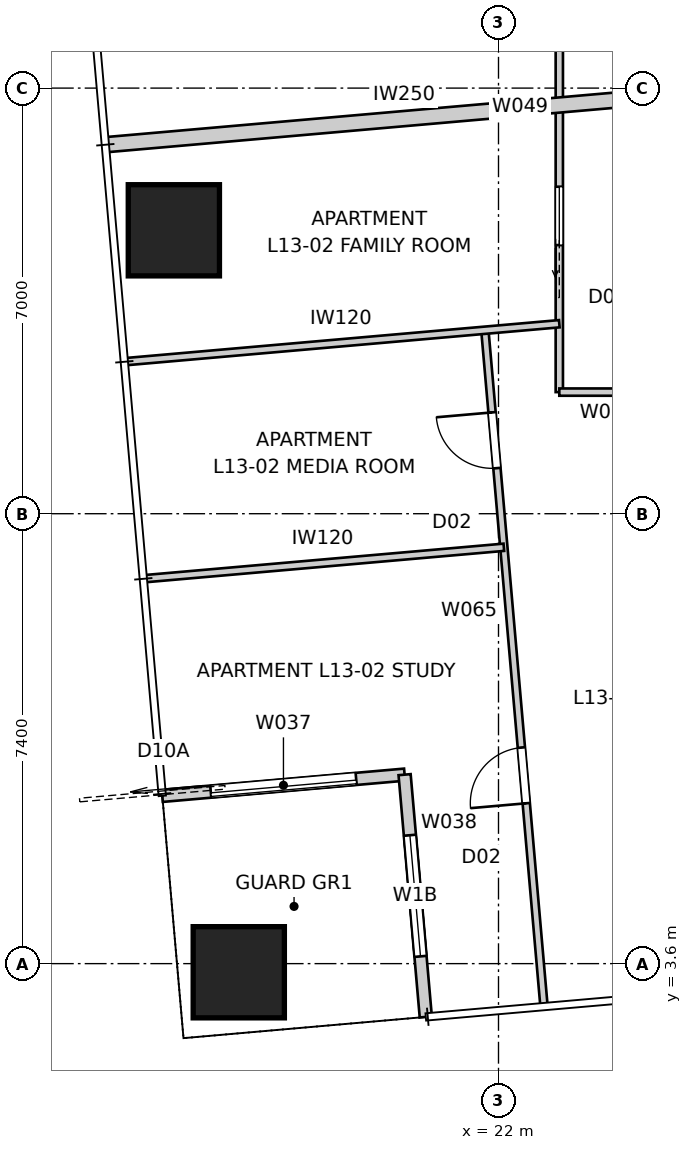
"""IFC4 building model, lengths in metres.
Left out: names, types, materials, properties, quantities, classifications, styles, units other than length and angle.
Written with IfcOpenShell. Run it as: python <this file> out.ifc"""

import sys

from ifc_helpers import new_model, si_unit, direction, frame, frame_2d, origin, origin_2d, place, context, subcontext, project, spatial, rectangle, extrude, element, fill, save


model = new_model("IFC4")
c1 = context("Model", 3, precision=1e-05, world=origin(), true_north=direction((0.0, 1.0)))
c2 = subcontext(c1, "Body", "Model", "MODEL_VIEW")
j1 = project(units=[si_unit("LENGTHUNIT", "METRE"), si_unit("PLANEANGLEUNIT", "RADIAN")], contexts=[c1])
p1 = place(None, origin())
s1 = spatial("IfcSite", under=j1, at=p1, CompositionType="ELEMENT")
p2 = place(p1, origin())
s2 = spatial("IfcBuilding", under=s1, at=p2, CompositionType="ELEMENT")
p3 = place(p2, frame((0.0, 0.0, 50.6)))
s3 = spatial("IfcBuildingStorey", under=s2, at=p3, CompositionType="ELEMENT", Elevation=50.6)
for number, where, z_axis, x_axis in (
    (1, (17.729, 3.458, 0.0), (0.0, 0.0, 1.0), (1.0, 0.0, 0.0)),
    (2, (16.661, 15.661, 0.0), (0.0, 0.0, 1.0), (1.0, 0.0, 0.0)),
):
    element("IfcColumn", number, at=place(p3, frame(where, z_axis=z_axis, x_axis=x_axis)), inside=s3, PredefinedType="COLUMN", context=c2, shape_type="SweptSolid", body=[
        extrude(rectangle(XDim=1.5, YDim=1.5, at=origin_2d()), origin(), (0.0, 0.0, 1.0), 3.4),
    ])
p4 = place(p3, frame((16.471, 6.359, 0.0), z_axis=(0.0, 0.0, 1.0), x_axis=(0.99619418125, 0.087161650072, 0.0)))
e3 = element("IfcWall", 3, at=p4, inside=s3, PredefinedType="SOLIDWALL", context=c2, shape_type="SweptSolid", body=[
    extrude(rectangle(XDim=4.0, YDim=0.2, at=frame_2d((2.0, 0.0))), origin(), (0.0, 0.0, 1.0), 3.25),
])
p5 = place(p4, frame((0.8, 0.0, 0.0)))
e4 = element("IfcOpeningElement", 4, at=p5, cuts=e3, PredefinedType="OPENING", context=c2, shape_type="SweptSolid", body=[
    extrude(rectangle(XDim=2.4, YDim=2.1, at=frame_2d((1.2, 1.05))), frame((0.0, 0.11, 0.0), z_axis=(0.0, -1.0, 0.0), x_axis=(1.0, 0.0, 0.0)), (0.0, 0.0, 1.0), 0.22),
])
p6 = place(p3, frame((20.456, 6.708, 0.0), z_axis=(0.0, 0.0, 1.0), x_axis=(0.087156350505, -0.99619464492, 0.0)))
e5 = element("IfcWall", 5, at=p6, inside=s3, PredefinedType="SOLIDWALL", context=c2, shape_type="SweptSolid", body=[
    extrude(rectangle(XDim=4.0, YDim=0.2, at=frame_2d((2.0, 0.0))), origin(), (0.0, 0.0, 1.0), 3.25),
])
p7 = place(p6, frame((1.0, 0.0, 0.45)))
e6 = element("IfcOpeningElement", 6, at=p7, cuts=e5, PredefinedType="OPENING", context=c2, shape_type="SweptSolid", body=[
    extrude(rectangle(XDim=2.0, YDim=1.8, at=frame_2d((1.0, 0.9))), frame((0.0, 0.11, 0.0), z_axis=(0.0, -1.0, 0.0), x_axis=(1.0, 0.0, 0.0)), (0.0, 0.0, 1.0), 0.22),
])
p8 = place(p3, frame((15.534, 17.068, 0.0), z_axis=(0.0, 0.0, 1.0), x_axis=(0.996194517831, 0.087157803114, 0.0)))
e7 = element("IfcWall", 7, at=p8, inside=s3, PredefinedType="PARTITIONING", context=c2, shape_type="SweptSolid", body=[
    extrude(rectangle(XDim=9.933, YDim=0.25, at=frame_2d((4.966, 0.0))), origin(), (0.0, 0.0, 1.0), 3.25),
])
p9 = place(p3, frame((23.0, 13.0, 0.0), z_axis=(0.0, 0.0, 1.0), x_axis=(0.0, 1.0, 0.0)))
e8 = element("IfcWall", 8, at=p9, inside=s3, PredefinedType="PARTITIONING", context=c2, shape_type="SweptSolid", body=[
    extrude(rectangle(XDim=6.0, YDim=0.12, at=frame_2d((3.0, 0.0))), origin(), (0.0, 0.0, 1.0), 3.25),
])
p10 = place(p9, frame((2.418, 0.0, 0.0)))
e9 = element("IfcOpeningElement", 9, at=p10, cuts=e8, PredefinedType="OPENING", context=c2, shape_type="SweptSolid", body=[
    extrude(rectangle(XDim=0.96, YDim=2.1, at=frame_2d((0.48, 1.05))), frame((0.0, 0.07, 0.0), z_axis=(0.0, -1.0, 0.0), x_axis=(1.0, 0.0, 0.0)), (0.0, 0.0, 1.0), 0.14),
])
p11 = place(p3, frame((29.0, 13.0, 0.0), z_axis=(0.0, 0.0, 1.0), x_axis=(-1.0, 0.0, 0.0)))
e10 = element("IfcWall", 10, at=p11, inside=s3, PredefinedType="PARTITIONING", context=c2, shape_type="SweptSolid", body=[
    extrude(rectangle(XDim=6.0, YDim=0.12, at=frame_2d((3.0, 0.0))), origin(), (0.0, 0.0, 1.0), 3.25),
])
p12 = place(p11, frame((3.445, 0.0, 0.0)))
e11 = element("IfcOpeningElement", 11, at=p12, cuts=e10, PredefinedType="OPENING", context=c2, shape_type="SweptSolid", body=[
    extrude(rectangle(XDim=0.96, YDim=2.1, at=frame_2d((0.48, 1.05))), frame((0.0, 0.07, 0.0), z_axis=(0.0, -1.0, 0.0), x_axis=(1.0, 0.0, 0.0)), (0.0, 0.0, 1.0), 0.14),
])
p13 = place(p11, frame((0.769, 0.0, 0.0)))
e12 = element("IfcOpeningElement", 12, at=p13, cuts=e10, PredefinedType="OPENING", context=c2, shape_type="SweptSolid", body=[
    extrude(rectangle(XDim=0.96, YDim=2.1, at=frame_2d((0.48, 1.05))), frame((0.0, 0.07, 0.0), z_axis=(0.0, -1.0, 0.0), x_axis=(1.0, 0.0, 0.0)), (0.0, 0.0, 1.0), 0.14),
])
p14 = place(p3, frame((22.745, 2.933, 0.0), z_axis=(0.0, 0.0, 1.0), x_axis=(-0.087152252187, 0.99619500347, 0.0)))
e13 = element("IfcWall", 13, at=p14, inside=s3, PredefinedType="PARTITIONING", context=c2, shape_type="SweptSolid", body=[
    extrude(rectangle(XDim=11.127, YDim=0.12, at=frame_2d((5.563, 0.0))), origin(), (0.0, 0.0, 1.0), 3.25),
])
p15 = place(p14, frame((3.317, 0.0, 0.0)))
e14 = element("IfcOpeningElement", 14, at=p15, cuts=e13, PredefinedType="OPENING", context=c2, shape_type="SweptSolid", body=[
    extrude(rectangle(XDim=0.92, YDim=2.34, at=frame_2d((0.46, 1.17))), frame((0.0, 0.07, 0.0), z_axis=(0.0, -1.0, 0.0), x_axis=(1.0, 0.0, 0.0)), (0.0, 0.0, 1.0), 0.14),
])
p16 = place(p14, frame((8.85, 0.0, 0.0)))
e15 = element("IfcOpeningElement", 15, at=p16, cuts=e13, PredefinedType="OPENING", context=c2, shape_type="SweptSolid", body=[
    extrude(rectangle(XDim=0.92, YDim=2.34, at=frame_2d((0.46, 1.17))), frame((0.0, 0.07, 0.0), z_axis=(0.0, -1.0, 0.0), x_axis=(1.0, 0.0, 0.0)), (0.0, 0.0, 1.0), 0.14),
])
p17 = place(p3, frame((15.886, 13.502, 0.0), z_axis=(0.0, 0.0, 1.0), x_axis=(0.996195424363, 0.087147441029, 0.0)))
e16 = element("IfcWall", 16, at=p17, inside=s3, PredefinedType="PARTITIONING", context=c2, shape_type="SweptSolid", body=[
    extrude(rectangle(XDim=7.141, YDim=0.12, at=frame_2d((3.57, 0.0))), origin(), (0.0, 0.0, 1.0), 2.638),
])
p18 = place(p3, frame((16.198, 9.933, 0.0), z_axis=(0.0, 0.0, 1.0), x_axis=(0.996196451325, 0.087135700879, 0.0)))
e17 = element("IfcWall", 17, at=p18, inside=s3, PredefinedType="PARTITIONING", context=c2, shape_type="SweptSolid", body=[
    extrude(rectangle(XDim=5.912, YDim=0.12, at=frame_2d((2.956, 0.0))), origin(), (0.0, 0.0, 1.0), 3.25),
])
p19 = place(p5, origin())
e18 = element("IfcDoor", 18, at=p19, inside=s3, OperationType="SLIDING_TO_LEFT", PredefinedType="DOOR", context=c2, shape_type="SweptSolid", body=[
    extrude(rectangle(XDim=2.4, YDim=2.1, at=frame_2d((1.2, 1.05))), frame((0.0, 0.025, 0.0), z_axis=(0.0, -1.0, 0.0), x_axis=(1.0, 0.0, 0.0)), (0.0, 0.0, 1.0), 0.05),
])
fill(e4, e18)
p20 = place(p7, origin())
e19 = element("IfcWindow", 19, at=p20, inside=s3, PartitioningType="SINGLE_PANEL", PredefinedType="WINDOW", context=c2, shape_type="SweptSolid", body=[
    extrude(rectangle(XDim=2.0, YDim=1.8, at=frame_2d((1.0, 0.9))), frame((0.0, 0.03, 0.0), z_axis=(0.0, -1.0, 0.0), x_axis=(1.0, 0.0, 0.0)), (0.0, 0.0, 1.0), 0.06),
])
fill(e6, e19)
p21 = place(p10, origin())
e20 = element("IfcDoor", 20, at=p21, inside=s3, OperationType="SLIDING_TO_LEFT", PredefinedType="DOOR", context=c2, shape_type="SweptSolid", body=[
    extrude(rectangle(XDim=0.96, YDim=2.1, at=frame_2d((0.48, 1.05))), frame((0.0, 0.025, 0.0), z_axis=(0.0, -1.0, 0.0), x_axis=(1.0, 0.0, 0.0)), (0.0, 0.0, 1.0), 0.05),
])
fill(e9, e20)
p22 = place(p15, origin())
e21 = element("IfcDoor", 21, at=p22, inside=s3, OperationType="SINGLE_SWING_LEFT", PredefinedType="DOOR", context=c2, shape_type="SweptSolid", body=[
    extrude(rectangle(XDim=0.92, YDim=2.34, at=frame_2d((0.46, 1.17))), frame((0.0, 0.025, 0.0), z_axis=(0.0, -1.0, 0.0), x_axis=(1.0, 0.0, 0.0)), (0.0, 0.0, 1.0), 0.05),
])
fill(e14, e21)
p23 = place(p16, origin())
e22 = element("IfcDoor", 22, at=p23, inside=s3, OperationType="SINGLE_SWING_RIGHT", PredefinedType="DOOR", context=c2, shape_type="SweptSolid", body=[
    extrude(rectangle(XDim=0.92, YDim=2.34, at=frame_2d((0.46, 1.17))), frame((0.0, 0.025, 0.0), z_axis=(0.0, -1.0, 0.0), x_axis=(1.0, 0.0, 0.0)), (0.0, 0.0, 1.0), 0.05),
])
fill(e15, e22)
save(model, sys.argv[1])
